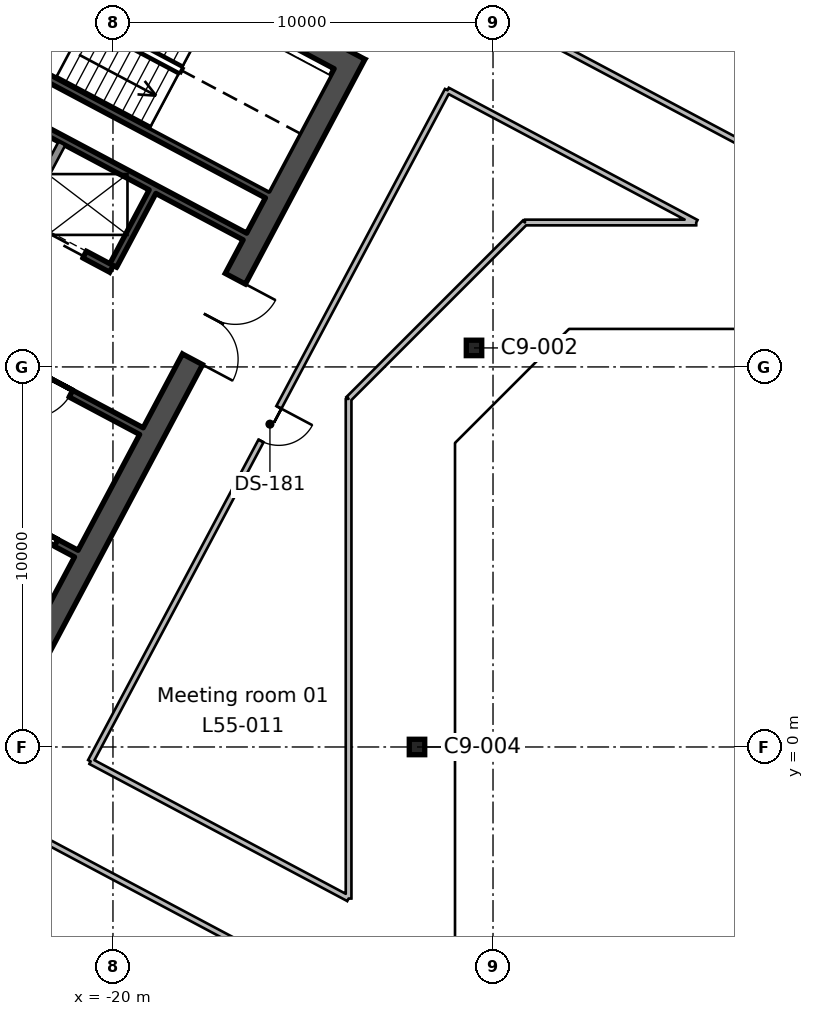
"""IFC4 building model, lengths in metres.
Left out: names, types, materials, properties, quantities, classifications, styles, units other than length and angle.
Written with IfcOpenShell. Run it as: python <this file> out.ifc"""

import sys

from ifc_helpers import new_model, si_unit, direction, frame, frame_2d, origin, origin_2d, place, context, subcontext, project, spatial, rectangle, hollow_rectangle, extrude, element, fill, save


model = new_model("IFC4")
c1 = context("Model", 3, precision=1e-05, world=origin(), true_north=direction((0.0, 1.0)))
c2 = subcontext(c1, "Body", "Model", "MODEL_VIEW")
j1 = project(units=[si_unit("LENGTHUNIT", "METRE"), si_unit("PLANEANGLEUNIT", "RADIAN")], contexts=[c1])
p1 = place(None, origin())
s1 = spatial("IfcSite", under=j1, at=p1, CompositionType="ELEMENT")
p2 = place(p1, origin())
s2 = spatial("IfcBuilding", under=s1, at=p2, CompositionType="ELEMENT")
p3 = place(p2, frame((0.0, 0.0, 248.1)))
s3 = spatial("IfcBuildingStorey", under=s2, at=p3, CompositionType="ELEMENT", Elevation=248.1)
for number, where, z_axis, x_axis in (
    (1, (-12.0, 0.0, 0.0), (0.0, 0.0, 1.0), (1.0, 0.0, 0.0)),
    (2, (-10.5, 10.5, 0.0), (0.0, 0.0, 1.0), (1.0, 0.0, 0.0)),
):
    element("IfcColumn", number, at=place(p3, frame(where, z_axis=z_axis, x_axis=x_axis)), inside=s3, PredefinedType="COLUMN", context=c2, shape_type="SweptSolid", body=[
        extrude(hollow_rectangle(XDim=0.406, YDim=0.406, WallThickness=0.015, InnerFilletRadius=0.007, OuterFilletRadius=0.022, at=origin_2d()), origin(), (0.0, 0.0, 1.0), 3.9),
    ])
p4 = place(p3, frame((-13.635, 18.236, 0.0), z_axis=(0.0, 0.0, 1.0), x_axis=(-0.469478769487, -0.88294376095, 0.0)))
e3 = element("IfcWall", 3, at=p4, inside=s3, PredefinedType="SHEAR", context=c2, shape_type="SweptSolid", body=[
    extrude(rectangle(XDim=19.4, YDim=0.6, at=frame_2d((9.7, 0.0))), origin(), (0.0, 0.0, 1.0), 3.9),
])
p5 = place(p4, frame((6.7, 0.0, 0.0)))
e4 = element("IfcOpeningElement", 4, at=p5, cuts=e3, PredefinedType="OPENING", context=c2, shape_type="SweptSolid", body=[
    extrude(rectangle(XDim=2.4, YDim=2.4, at=frame_2d((1.2, 1.2))), frame((0.0, 0.31, 0.0), z_axis=(0.0, -1.0, 0.0), x_axis=(1.0, 0.0, 0.0)), (0.0, 0.0, 1.0), 0.62),
])
p6 = place(p3, frame((-14.041, 18.112, 0.0), z_axis=(0.0, 0.0, 1.0), x_axis=(-0.882947755831, 0.46947125628, 0.0)))
e5 = element("IfcWall", 5, at=p6, inside=s3, PredefinedType="SHEAR", context=c2, shape_type="SweptSolid", body=[
    extrude(rectangle(XDim=20.2, YDim=0.6, at=frame_2d((10.1, 0.0))), origin(), (0.0, 0.0, 1.0), 3.9),
])
p7 = place(p3, frame((-18.96, 14.611, 0.0), z_axis=(0.0, 0.0, 1.0), x_axis=(-0.4694473164, -0.882960484464, 0.0)))
e6 = element("IfcWall", 6, at=p7, inside=s3, PredefinedType="SHEAR", context=c2, shape_type="SweptSolid", body=[
    extrude(rectangle(XDim=2.2, YDim=0.2, at=frame_2d((1.1, 0.0))), origin(), (0.0, 0.0, 1.0), 3.9),
])
p8 = place(p3, frame((-21.344, 15.879, 0.0), z_axis=(0.0, 0.0, 1.0), x_axis=(-0.4694473164, -0.882960484464, 0.0)))
e7 = element("IfcWall", 7, at=p8, inside=s3, PredefinedType="SOLIDWALL", context=c2, shape_type="SweptSolid", body=[
    extrude(rectangle(XDim=2.2, YDim=0.2, at=frame_2d((1.1, 0.0))), origin(), (0.0, 0.0, 1.0), 3.9),
])
p9 = place(p3, frame((-21.333, 21.649, 0.0), z_axis=(0.0, 0.0, 1.0), x_axis=(-0.469494272526, -0.882935517501, 0.0)))
e8 = element("IfcWall", 8, at=p9, inside=s3, PredefinedType="SHEAR", context=c2, shape_type="SweptSolid", body=[
    extrude(rectangle(XDim=7.3, YDim=0.2, at=frame_2d((3.65, 0.0))), origin(), (0.0, 0.0, 1.0), 3.9),
])
p10 = place(p9, frame((1.3, 0.0, 0.0)))
e9 = element("IfcOpeningElement", 9, at=p10, cuts=e8, PredefinedType="OPENING", context=c2, shape_type="SweptSolid", body=[
    extrude(rectangle(XDim=1.2, YDim=2.1, at=frame_2d((0.6, 1.05))), frame((0.0, 0.11, 0.0), z_axis=(0.0, -1.0, 0.0), x_axis=(1.0, 0.0, 0.0)), (0.0, 0.0, 1.0), 0.22),
])
p11 = place(p3, frame((-15.942, 14.536, 0.0), z_axis=(0.0, 0.0, 1.0), x_axis=(-0.882946947542, 0.469472776449, 0.0)))
e10 = element("IfcWall", 10, at=p11, inside=s3, PredefinedType="SHEAR", context=c2, shape_type="SweptSolid", body=[
    extrude(rectangle(XDim=8.0, YDim=0.2, at=frame_2d((4.0, 0.0))), origin(), (0.0, 0.0, 1.0), 3.9),
])
p12 = place(p3, frame((-16.529, 13.432, 0.0), z_axis=(0.0, 0.0, 1.0), x_axis=(-0.88295287151, 0.469461634952, 0.0)))
e11 = element("IfcWall", 11, at=p12, inside=s3, PredefinedType="SHEAR", context=c2, shape_type="SweptSolid", body=[
    extrude(rectangle(XDim=8.0, YDim=0.2, at=frame_2d((4.0, 0.0))), origin(), (0.0, 0.0, 1.0), 3.9),
])
p13 = place(p3, frame((-20.04, 12.581, 0.0), z_axis=(0.0, 0.0, 1.0), x_axis=(-0.882942972946, 0.469480251476, 0.0)))
e12 = element("IfcWall", 12, at=p13, inside=s3, PredefinedType="SHEAR", context=c2, shape_type="SweptSolid", body=[
    extrude(rectangle(XDim=5.4, YDim=0.2, at=frame_2d((2.7, 0.0))), origin(), (0.0, 0.0, 1.0), 3.9),
])
p14 = place(p13, frame((0.8, 0.0, 0.0)))
e13 = element("IfcOpeningElement", 13, at=p14, cuts=e12, PredefinedType="OPENING", context=c2, shape_type="SweptSolid", body=[
    extrude(rectangle(XDim=1.1, YDim=2.1, at=frame_2d((0.55, 1.05))), frame((0.0, 0.11, 0.0), z_axis=(0.0, -1.0, 0.0), x_axis=(1.0, 0.0, 0.0)), (0.0, 0.0, 1.0), 0.22),
])
p15 = place(p13, frame((3.5, 0.0, 0.0)))
e14 = element("IfcOpeningElement", 14, at=p15, cuts=e12, PredefinedType="OPENING", context=c2, shape_type="SweptSolid", body=[
    extrude(rectangle(XDim=1.1, YDim=2.1, at=frame_2d((0.55, 1.05))), frame((0.0, 0.11, 0.0), z_axis=(0.0, -1.0, 0.0), x_axis=(1.0, 0.0, 0.0)), (0.0, 0.0, 1.0), 0.22),
])
p16 = place(p3, frame((-19.252, 8.311, 0.0), z_axis=(0.0, 0.0, 1.0), x_axis=(-0.882955722218, 0.469456273365, 0.0)))
e15 = element("IfcWall", 15, at=p16, inside=s3, PredefinedType="SHEAR", context=c2, shape_type="SweptSolid", body=[
    extrude(rectangle(XDim=10.0, YDim=0.2, at=frame_2d((5.0, 0.0))), origin(), (0.0, 0.0, 1.0), 3.9),
])
p17 = place(p16, frame((2.1, 0.0, 0.0)))
e16 = element("IfcOpeningElement", 16, at=p17, cuts=e15, PredefinedType="OPENING", context=c2, shape_type="SweptSolid", body=[
    extrude(rectangle(XDim=1.2, YDim=2.1, at=frame_2d((0.6, 1.05))), frame((0.0, 0.11, 0.0), z_axis=(0.0, -1.0, 0.0), x_axis=(1.0, 0.0, 0.0)), (0.0, 0.0, 1.0), 0.22),
])
p18 = place(p16, frame((6.85, 0.0, 0.0)))
e17 = element("IfcOpeningElement", 17, at=p18, cuts=e15, PredefinedType="OPENING", context=c2, shape_type="SweptSolid", body=[
    extrude(rectangle(XDim=0.9, YDim=2.1, at=frame_2d((0.45, 1.05))), frame((0.0, 0.11, 0.0), z_axis=(0.0, -1.0, 0.0), x_axis=(1.0, 0.0, 0.0)), (0.0, 0.0, 1.0), 0.22),
])
p19 = place(p3, frame((-20.965, 5.088, 0.0), z_axis=(0.0, 0.0, 1.0), x_axis=(-0.882925986334, 0.469512196493, 0.0)))
e18 = element("IfcWall", 18, at=p19, inside=s3, PredefinedType="SHEAR", context=c2, shape_type="SweptSolid", body=[
    extrude(rectangle(XDim=4.5, YDim=0.2, at=frame_2d((2.25, 0.0))), origin(), (0.0, 0.0, 1.0), 3.9),
])
p20 = place(p19, frame((0.6, 0.0, 0.0)))
e19 = element("IfcOpeningElement", 19, at=p20, cuts=e18, PredefinedType="OPENING", context=c2, shape_type="SweptSolid", body=[
    extrude(rectangle(XDim=1.1, YDim=2.1, at=frame_2d((0.55, 1.05))), frame((0.0, 0.11, 0.0), z_axis=(0.0, -1.0, 0.0), x_axis=(1.0, 0.0, 0.0)), (0.0, 0.0, 1.0), 0.22),
])
p21 = place(p3, frame((-48.541, 39.854, 0.0), z_axis=(0.0, 0.0, 1.0), x_axis=(0.882945008423, -0.469476423372, 0.0)))
e20 = element("IfcWall", 20, at=p21, inside=s3, PredefinedType="PARTITIONING", context=c2, shape_type="SweptSolid", body=[
    extrude(rectangle(XDim=54.976, YDim=0.15, at=frame_2d((27.488, 0.0))), origin(), (0.0, 0.0, 1.0), 3.45),
])
p22 = place(p21, frame((33.65, 0.0, 0.0)))
e21 = element("IfcOpeningElement", 21, at=p22, cuts=e20, PredefinedType="OPENING", context=c2, shape_type="SweptSolid", body=[
    extrude(rectangle(XDim=1.8, YDim=2.1, at=frame_2d((0.9, 1.05))), frame((0.0, 0.085, 0.0), z_axis=(0.0, -1.0, 0.0), x_axis=(1.0, 0.0, 0.0)), (0.0, 0.0, 1.0), 0.17),
])
p23 = place(p21, frame((26.95, 0.0, 0.0)))
e22 = element("IfcOpeningElement", 22, at=p23, cuts=e20, PredefinedType="OPENING", context=c2, shape_type="SweptSolid", body=[
    extrude(rectangle(XDim=1.0, YDim=2.1, at=frame_2d((0.5, 1.05))), frame((0.0, 0.085, 0.0), z_axis=(0.0, -1.0, 0.0), x_axis=(1.0, 0.0, 0.0)), (0.0, 0.0, 1.0), 0.17),
])
p24 = place(p21, frame((21.05, 0.0, 0.0)))
e23 = element("IfcOpeningElement", 23, at=p24, cuts=e20, PredefinedType="OPENING", context=c2, shape_type="SweptSolid", body=[
    extrude(rectangle(XDim=1.0, YDim=2.1, at=frame_2d((0.5, 1.05))), frame((0.0, 0.085, 0.0), z_axis=(0.0, -1.0, 0.0), x_axis=(1.0, 0.0, 0.0)), (0.0, 0.0, 1.0), 0.17),
])
p25 = place(p21, frame((15.35, 0.0, 0.0)))
e24 = element("IfcOpeningElement", 24, at=p25, cuts=e20, PredefinedType="OPENING", context=c2, shape_type="SweptSolid", body=[
    extrude(rectangle(XDim=1.0, YDim=2.1, at=frame_2d((0.5, 1.05))), frame((0.0, 0.085, 0.0), z_axis=(0.0, -1.0, 0.0), x_axis=(1.0, 0.0, 0.0)), (0.0, 0.0, 1.0), 0.17),
])
p26 = place(p3, frame((-13.8, -6.706, 0.0), z_axis=(0.0, 0.0, 1.0), x_axis=(-0.882947286887, 0.469472138235, 0.0)))
e25 = element("IfcWall", 25, at=p26, inside=s3, PredefinedType="PARTITIONING", context=c2, shape_type="SweptSolid", body=[
    extrude(rectangle(XDim=36.571, YDim=0.15, at=frame_2d((18.285, 0.0))), origin(), (0.0, 0.0, 1.0), 3.45),
])
p27 = place(p26, frame((34.15, 0.0, 0.0)))
e26 = element("IfcOpeningElement", 26, at=p27, cuts=e25, PredefinedType="OPENING", context=c2, shape_type="SweptSolid", body=[
    extrude(rectangle(XDim=1.0, YDim=2.1, at=frame_2d((0.5, 1.05))), frame((0.0, 0.085, 0.0), z_axis=(0.0, -1.0, 0.0), x_axis=(1.0, 0.0, 0.0)), (0.0, 0.0, 1.0), 0.17),
])
p28 = place(p26, frame((20.25, 0.0, 0.0)))
e27 = element("IfcOpeningElement", 27, at=p28, cuts=e25, PredefinedType="OPENING", context=c2, shape_type="SweptSolid", body=[
    extrude(rectangle(XDim=1.0, YDim=2.1, at=frame_2d((0.5, 1.05))), frame((0.0, 0.085, 0.0), z_axis=(0.0, -1.0, 0.0), x_axis=(1.0, 0.0, 0.0)), (0.0, 0.0, 1.0), 0.17),
])
p29 = place(p26, frame((17.75, 0.0, 0.0)))
e28 = element("IfcOpeningElement", 28, at=p29, cuts=e25, PredefinedType="OPENING", context=c2, shape_type="SweptSolid", body=[
    extrude(rectangle(XDim=1.0, YDim=2.1, at=frame_2d((0.5, 1.05))), frame((0.0, 0.085, 0.0), z_axis=(0.0, -1.0, 0.0), x_axis=(1.0, 0.0, 0.0)), (0.0, 0.0, 1.0), 0.17),
])
p30 = place(p3, frame((-20.588, -0.379, 0.0), z_axis=(0.0, 0.0, 1.0), x_axis=(0.469489882812, 0.882937851685, 0.0)))
e29 = element("IfcWall", 29, at=p30, inside=s3, PredefinedType="PARTITIONING", context=c2, shape_type="SweptSolid", body=[
    extrude(rectangle(XDim=20.0, YDim=0.15, at=frame_2d((10.0, 0.0))), origin(), (0.0, 0.0, 1.0), 3.45),
])
p31 = place(p30, frame((9.55, 0.0, 0.0)))
e30 = element("IfcOpeningElement", 30, at=p31, cuts=e29, PredefinedType="OPENING", context=c2, shape_type="SweptSolid", body=[
    extrude(rectangle(XDim=1.0, YDim=2.1, at=frame_2d((0.5, 1.05))), frame((0.0, 0.085, 0.0), z_axis=(0.0, -1.0, 0.0), x_axis=(1.0, 0.0, 0.0)), (0.0, 0.0, 1.0), 0.17),
])
p32 = place(p3, frame((-11.198, 17.28, 0.0), z_axis=(0.0, 0.0, 1.0), x_axis=(0.88294849999, -0.469469856717, 0.0)))
e31 = element("IfcWall", 31, at=p32, inside=s3, PredefinedType="PARTITIONING", context=c2, shape_type="SweptSolid", body=[
    extrude(rectangle(XDim=7.413, YDim=0.15, at=frame_2d((3.706, 0.0))), origin(), (0.0, 0.0, 1.0), 3.45),
])
p33 = place(p3, frame((-4.653, 13.8, 0.0), z_axis=(0.0, 0.0, 1.0), x_axis=(-1.0, 0.0, 0.0)))
e32 = element("IfcWall", 32, at=p33, inside=s3, PredefinedType="PARTITIONING", context=c2, shape_type="SweptSolid", body=[
    extrude(rectangle(XDim=4.507, YDim=0.15, at=frame_2d((2.253, 0.0))), origin(), (0.0, 0.0, 1.0), 3.45),
])
p34 = place(p3, frame((-9.16, 13.8, 0.0), z_axis=(0.0, 0.0, 1.0), x_axis=(-0.707106781187, -0.707106781187, 0.0)))
e33 = element("IfcWall", 33, at=p34, inside=s3, PredefinedType="PARTITIONING", context=c2, shape_type="SweptSolid", body=[
    extrude(rectangle(XDim=6.562, YDim=0.15, at=frame_2d((3.281, 0.0))), origin(), (0.0, 0.0, 1.0), 3.45),
])
p35 = place(p3, frame((-13.8, 9.16, 0.0), z_axis=(0.0, 0.0, 1.0), x_axis=(0.0, -1.0, 0.0)))
e34 = element("IfcWall", 34, at=p35, inside=s3, PredefinedType="PARTITIONING", context=c2, shape_type="SweptSolid", body=[
    extrude(rectangle(XDim=13.148, YDim=0.15, at=frame_2d((6.574, 0.0))), origin(), (0.0, 0.0, 1.0), 3.45),
])
p36 = place(p3, frame((-13.8, -3.988, 0.0), z_axis=(0.0, 0.0, 1.0), x_axis=(-0.882949137368, 0.469468657976, 0.0)))
e35 = element("IfcWall", 35, at=p36, inside=s3, PredefinedType="PARTITIONING", context=c2, shape_type="SweptSolid", body=[
    extrude(rectangle(XDim=7.688, YDim=0.15, at=frame_2d((3.844, 0.0))), origin(), (0.0, 0.0, 1.0), 3.45),
])
p37 = place(p5, origin())
e36 = element("IfcDoor", 36, at=p37, inside=s3, OperationType="DOUBLE_DOOR_SINGLE_SWING", PredefinedType="DOOR", context=c2, shape_type="SweptSolid", body=[
    extrude(rectangle(XDim=2.4, YDim=2.4, at=frame_2d((1.2, 1.2))), frame((0.0, 0.025, 0.0), z_axis=(0.0, -1.0, 0.0), x_axis=(1.0, 0.0, 0.0)), (0.0, 0.0, 1.0), 0.05),
])
fill(e4, e36)
p38 = place(p17, origin())
e37 = element("IfcDoor", 37, at=p38, inside=s3, OperationType="SINGLE_SWING_RIGHT", PredefinedType="DOOR", context=c2, shape_type="SweptSolid", body=[
    extrude(rectangle(XDim=1.2, YDim=2.1, at=frame_2d((0.6, 1.05))), frame((0.0, 0.025, 0.0), z_axis=(0.0, -1.0, 0.0), x_axis=(1.0, 0.0, 0.0)), (0.0, 0.0, 1.0), 0.05),
])
fill(e16, e37)
p39 = place(p14, origin())
e38 = element("IfcDoor", 38, at=p39, inside=s3, OperationType="DOUBLE_DOOR_SLIDING", PredefinedType="DOOR", context=c2, shape_type="SweptSolid", body=[
    extrude(rectangle(XDim=1.1, YDim=2.1, at=frame_2d((0.55, 1.05))), frame((0.0, 0.025, 0.0), z_axis=(0.0, -1.0, 0.0), x_axis=(1.0, 0.0, 0.0)), (0.0, 0.0, 1.0), 0.05),
])
fill(e13, e38)
p40 = place(p20, origin())
e39 = element("IfcDoor", 39, at=p40, inside=s3, OperationType="DOUBLE_DOOR_SLIDING", PredefinedType="DOOR", context=c2, shape_type="SweptSolid", body=[
    extrude(rectangle(XDim=1.1, YDim=2.1, at=frame_2d((0.55, 1.05))), frame((0.0, 0.025, 0.0), z_axis=(0.0, -1.0, 0.0), x_axis=(1.0, 0.0, 0.0)), (0.0, 0.0, 1.0), 0.05),
])
fill(e19, e39)
p41 = place(p31, frame((1.0, 0.0, 0.0), z_axis=(0.0, 0.0, 1.0), x_axis=(-1.0, 0.0, 0.0)))
e40 = element("IfcDoor", 40, at=p41, inside=s3, OperationType="SINGLE_SWING_LEFT", PredefinedType="DOOR", context=c2, shape_type="SweptSolid", body=[
    extrude(rectangle(XDim=1.0, YDim=2.1, at=frame_2d((0.5, 1.05))), frame((0.0, 0.025, 0.0), z_axis=(0.0, -1.0, 0.0), x_axis=(1.0, 0.0, 0.0)), (0.0, 0.0, 1.0), 0.05),
])
fill(e30, e40)
save(model, sys.argv[1])
